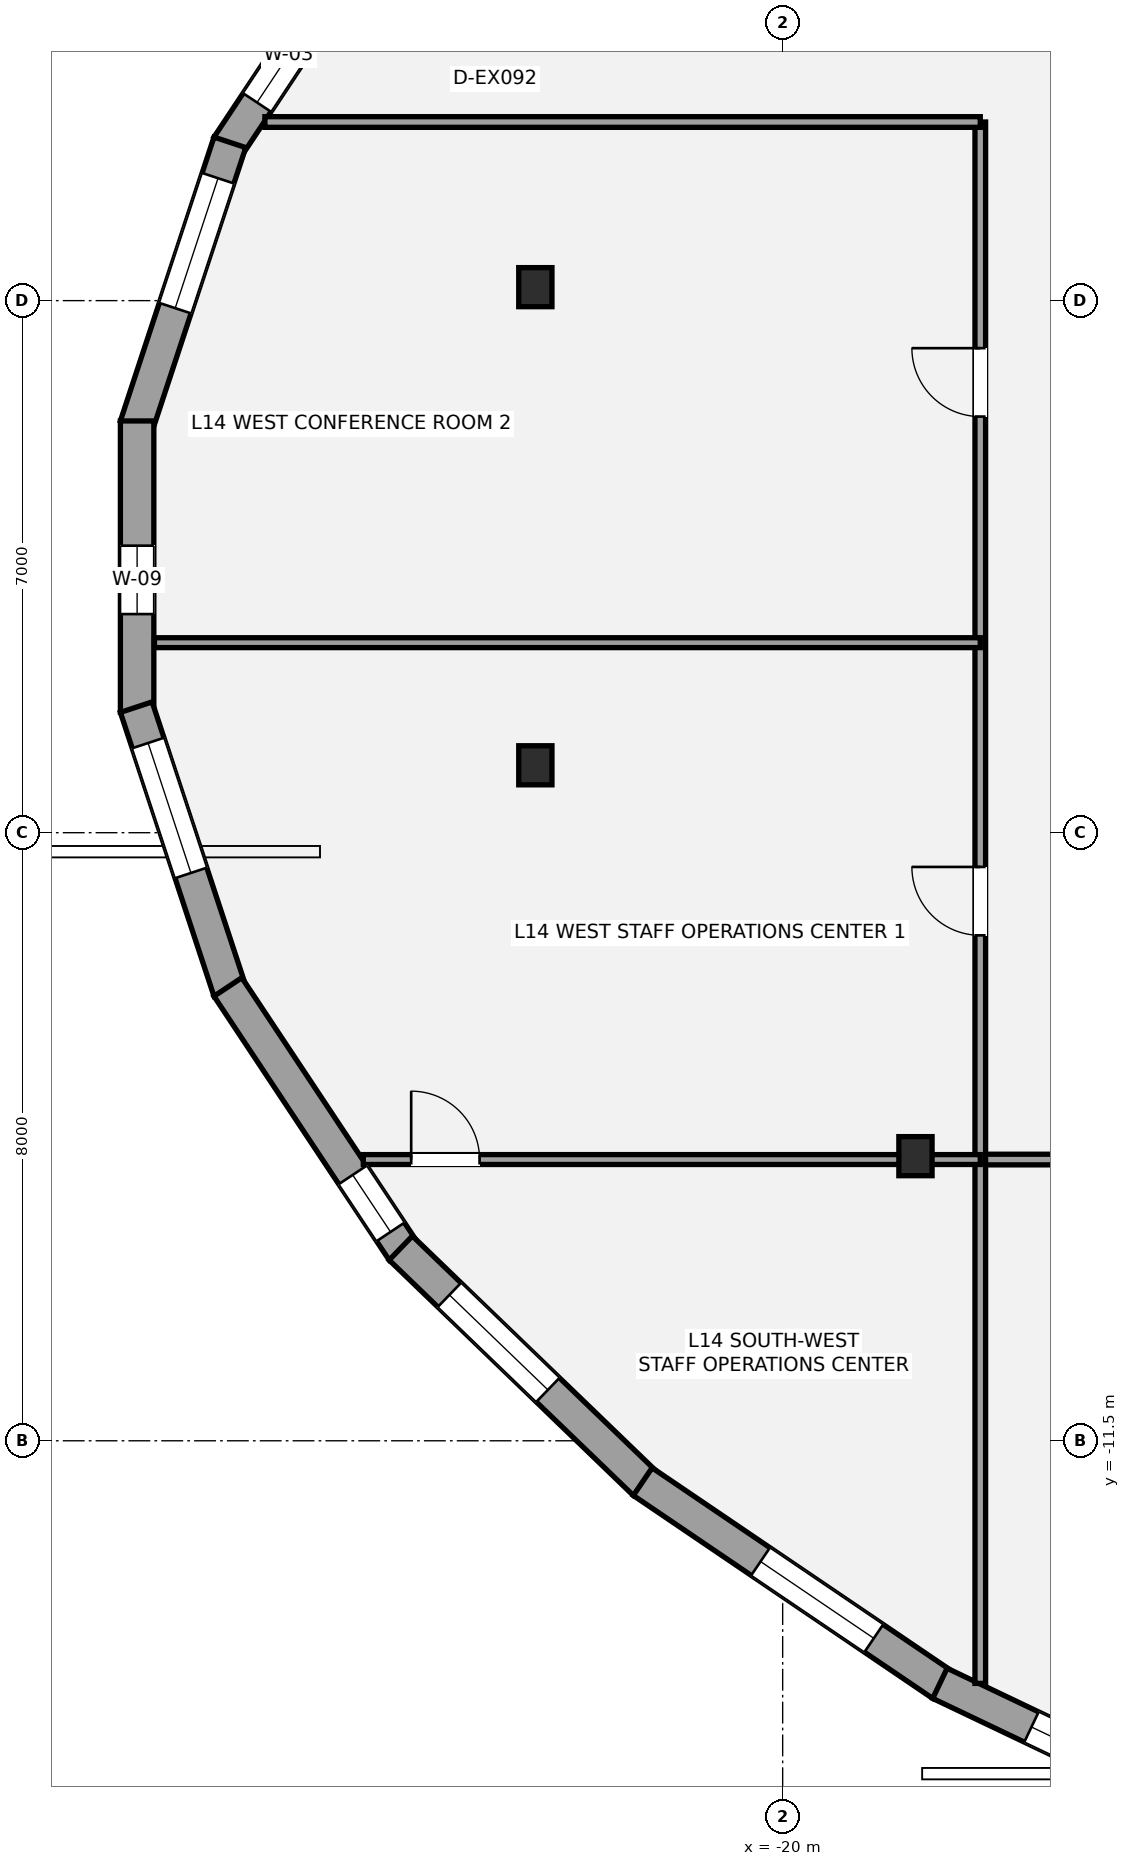
"""IFC4 building model, lengths in metres.
Left out: names, types, materials, properties, quantities, classifications, styles, units other than length and angle.
Written with IfcOpenShell. Run it as: python <this file> out.ifc"""

import sys

from ifc_helpers import new_model, si_unit, direction, frame, frame_2d, origin, origin_2d, place, context, subcontext, project, spatial, rectangle, i_section, extrude, element, fill, save


model = new_model("IFC4")
c1 = context("Model", 3, precision=1e-05, world=origin(), true_north=direction((0.0, 1.0)))
c2 = subcontext(c1, "Body", "Model", "MODEL_VIEW")
j1 = project(units=[si_unit("LENGTHUNIT", "METRE"), si_unit("PLANEANGLEUNIT", "RADIAN")], contexts=[c1])
p1 = place(None, origin())
s1 = spatial("IfcSite", under=j1, at=p1, CompositionType="ELEMENT")
p2 = place(p1, origin())
s2 = spatial("IfcBuilding", under=s1, at=p2, CompositionType="ELEMENT")
p3 = place(p2, frame((0.0, 0.0, 55.8)))
s3 = spatial("IfcBuildingStorey", under=s2, at=p3, CompositionType="ELEMENT", Elevation=55.8)
for number, where, z_axis, x_axis in (
    (1, (-23.254, 3.677, 0.0), (0.0, 0.0, 1.0), (1.0, 0.0, 0.0)),
    (2, (-23.254, -2.613, 0.0), (0.0, 0.0, 1.0), (1.0, 0.0, 0.0)),
    (3, (-18.253, -7.756, 0.0), (0.0, 0.0, 1.0), (1.0, 0.0, 0.0)),
):
    element("IfcColumn", number, at=place(p3, frame(where, z_axis=z_axis, x_axis=x_axis)), inside=s3, PredefinedType="COLUMN", context=c2, shape_type="SweptSolid", body=[
        extrude(i_section(OverallWidth=0.437, OverallDepth=0.514, WebThickness=0.061, FlangeThickness=0.097, at=origin_2d()), origin(), (0.0, 0.0, 1.0), 3.6),
    ])
p4 = place(p3, frame((-27.299, 5.53, 0.0), z_axis=(0.0, 0.0, 1.0), x_axis=(0.553144350008, 0.833085426625, 0.0)))
e4 = element("IfcWall", 4, at=p4, inside=s3, PredefinedType="STANDARD", context=c2, shape_type="SweptSolid", body=[
    extrude(rectangle(XDim=4.167, YDim=0.44, at=frame_2d((2.083, 0.0))), origin(), (0.0, 0.0, 1.0), 2.529),
])
p5 = place(p4, frame((0.693, 0.0, 0.65)))
e5 = element("IfcOpeningElement", 5, at=p5, cuts=e4, PredefinedType="OPENING", context=c2, shape_type="SweptSolid", body=[
    extrude(rectangle(XDim=1.5, YDim=1.7, at=frame_2d((0.75, 0.85))), frame((0.0, 0.23, 0.0), z_axis=(0.0, -1.0, 0.0), x_axis=(1.0, 0.0, 0.0)), (0.0, 0.0, 1.0), 0.46),
])
p6 = place(p3, frame((-28.505, 1.848, 0.0), z_axis=(0.0, 0.0, 1.0), x_axis=(0.31317140165, 0.949696621658, 0.0)))
e6 = element("IfcWall", 6, at=p6, inside=s3, PredefinedType="STANDARD", context=c2, shape_type="SweptSolid", body=[
    extrude(rectangle(XDim=3.932, YDim=0.44, at=frame_2d((1.966, 0.0))), origin(), (0.0, 0.0, 1.0), 2.533),
])
p7 = place(p6, frame((1.635, 0.0, 0.65)))
e7 = element("IfcOpeningElement", 7, at=p7, cuts=e6, PredefinedType="OPENING", context=c2, shape_type="SweptSolid", body=[
    extrude(rectangle(XDim=1.8, YDim=1.7, at=frame_2d((0.9, 0.85))), frame((0.0, 0.23, 0.0), z_axis=(0.0, -1.0, 0.0), x_axis=(1.0, 0.0, 0.0)), (0.0, 0.0, 1.0), 0.46),
])
p8 = place(p3, frame((-28.494, -1.917, 0.0), z_axis=(0.0, 0.0, 1.0), x_axis=(0.0, 1.0, 0.0)))
e8 = element("IfcWall", 8, at=p8, inside=s3, PredefinedType="STANDARD", context=c2, shape_type="SweptSolid", body=[
    extrude(rectangle(XDim=3.834, YDim=0.44, at=frame_2d((1.917, 0.0))), origin(), (0.0, 0.0, 1.0), 2.533),
])
p9 = place(p8, frame((1.293, 0.0, 0.58)))
e9 = element("IfcOpeningElement", 9, at=p9, cuts=e8, PredefinedType="OPENING", context=c2, shape_type="SweptSolid", body=[
    extrude(rectangle(XDim=0.9, YDim=1.35, at=frame_2d((0.45, 0.675))), frame((0.0, 0.23, 0.0), z_axis=(0.0, -1.0, 0.0), x_axis=(1.0, 0.0, 0.0)), (0.0, 0.0, 1.0), 0.46),
])
p10 = place(p3, frame((-27.273, -5.583, 0.0), z_axis=(0.0, 0.0, 1.0), x_axis=(-0.31317140165, 0.949696621658, 0.0)))
e10 = element("IfcWall", 10, at=p10, inside=s3, PredefinedType="STANDARD", context=c2, shape_type="SweptSolid", body=[
    extrude(rectangle(XDim=3.932, YDim=0.44, at=frame_2d((1.966, 0.0))), origin(), (0.0, 0.0, 1.0), 2.533),
])
p11 = place(p10, frame((1.635, 0.0, 0.65)))
e11 = element("IfcOpeningElement", 11, at=p11, cuts=e10, PredefinedType="OPENING", context=c2, shape_type="SweptSolid", body=[
    extrude(rectangle(XDim=1.8, YDim=1.7, at=frame_2d((0.9, 0.85))), frame((0.0, 0.23, 0.0), z_axis=(0.0, -1.0, 0.0), x_axis=(1.0, 0.0, 0.0)), (0.0, 0.0, 1.0), 0.46),
])
p12 = place(p3, frame((-24.994, -9.001, 0.0), z_axis=(0.0, 0.0, 1.0), x_axis=(-0.553144350008, 0.833085426625, 0.0)))
e12 = element("IfcWall", 12, at=p12, inside=s3, PredefinedType="STANDARD", context=c2, shape_type="SweptSolid", body=[
    extrude(rectangle(XDim=4.167, YDim=0.44, at=frame_2d((2.083, 0.0))), origin(), (0.0, 0.0, 1.0), 2.529),
])
p13 = place(p12, frame((0.299, 0.0, 0.58)))
e13 = element("IfcOpeningElement", 13, at=p13, cuts=e12, PredefinedType="OPENING", context=c2, shape_type="SweptSolid", body=[
    extrude(rectangle(XDim=0.9, YDim=1.35, at=frame_2d((0.45, 0.675))), frame((0.0, 0.23, 0.0), z_axis=(0.0, -1.0, 0.0), x_axis=(1.0, 0.0, 0.0)), (0.0, 0.0, 1.0), 0.46),
])
p14 = place(p3, frame((-21.812, -12.061, 0.0), z_axis=(0.0, 0.0, 1.0), x_axis=(-0.719928259859, 0.694048485811, 0.0)))
e14 = element("IfcWall", 14, at=p14, inside=s3, PredefinedType="STANDARD", context=c2, shape_type="SweptSolid", body=[
    extrude(rectangle(XDim=4.462, YDim=0.44, at=frame_2d((2.231, 0.0))), origin(), (0.0, 0.0, 1.0), 2.529),
])
p15 = place(p14, frame((1.774, 0.0, 0.65)))
e15 = element("IfcOpeningElement", 15, at=p15, cuts=e14, PredefinedType="OPENING", context=c2, shape_type="SweptSolid", body=[
    extrude(rectangle(XDim=1.8, YDim=1.7, at=frame_2d((0.9, 0.85))), frame((0.0, 0.23, 0.0), z_axis=(0.0, -1.0, 0.0), x_axis=(1.0, 0.0, 0.0)), (0.0, 0.0, 1.0), 0.46),
])
p16 = place(p3, frame((-17.903, -14.708, 0.0), z_axis=(0.0, 0.0, 1.0), x_axis=(-0.827723442454, 0.561136260468, 0.0)))
e16 = element("IfcWall", 16, at=p16, inside=s3, PredefinedType="STANDARD", context=c2, shape_type="SweptSolid", body=[
    extrude(rectangle(XDim=4.759, YDim=0.44, at=frame_2d((2.379, 0.0))), origin(), (0.0, 0.0, 1.0), 2.529),
])
p17 = place(p16, frame((1.086, 0.0, 0.65)))
e17 = element("IfcOpeningElement", 17, at=p17, cuts=e16, PredefinedType="OPENING", context=c2, shape_type="SweptSolid", body=[
    extrude(rectangle(XDim=1.8, YDim=1.7, at=frame_2d((0.9, 0.85))), frame((0.0, 0.23, 0.0), z_axis=(0.0, -1.0, 0.0), x_axis=(1.0, 0.0, 0.0)), (0.0, 0.0, 1.0), 0.46),
])
p18 = place(p3, frame((-13.363, -16.869, 0.0), z_axis=(0.0, 0.0, 1.0), x_axis=(-0.902682101727, 0.430308056189, 0.0)))
e18 = element("IfcWall", 18, at=p18, inside=s3, PredefinedType="STANDARD", context=c2, shape_type="SweptSolid", body=[
    extrude(rectangle(XDim=5.061, YDim=0.44, at=frame_2d((2.53, 0.0))), origin(), (0.0, 0.0, 1.0), 2.529),
])
p19 = place(p18, frame((1.927, 0.0, 0.65)))
e19 = element("IfcOpeningElement", 19, at=p19, cuts=e18, PredefinedType="OPENING", context=c2, shape_type="SweptSolid", body=[
    extrude(rectangle(XDim=1.8, YDim=1.7, at=frame_2d((0.9, 0.85))), frame((0.0, 0.23, 0.0), z_axis=(0.0, -1.0, 0.0), x_axis=(1.0, 0.0, 0.0)), (0.0, 0.0, 1.0), 0.46),
])
p20 = place(p3, frame((-17.4, -7.8, 0.0), z_axis=(0.0, 0.0, 1.0), x_axis=(1.0, 0.0, 0.0)))
e20 = element("IfcWall", 20, at=p20, inside=s3, PredefinedType="PARTITIONING", context=c2, shape_type="SweptSolid", body=[
    extrude(rectangle(XDim=34.8, YDim=0.14, at=frame_2d((17.4, 0.0))), origin(), (0.0, 0.0, 1.0), 2.779),
])
p21 = place(p20, frame((3.5, 0.0, 0.0)))
e21 = element("IfcOpeningElement", 21, at=p21, cuts=e20, PredefinedType="OPENING", context=c2, shape_type="SweptSolid", body=[
    extrude(rectangle(XDim=0.9, YDim=2.1, at=frame_2d((0.45, 1.05))), frame((0.0, 0.08, 0.0), z_axis=(0.0, -1.0, 0.0), x_axis=(1.0, 0.0, 0.0)), (0.0, 0.0, 1.0), 0.16),
])
p22 = place(p20, frame((10.95, 0.0, 0.0)))
e22 = element("IfcOpeningElement", 22, at=p22, cuts=e20, PredefinedType="OPENING", context=c2, shape_type="SweptSolid", body=[
    extrude(rectangle(XDim=0.9, YDim=2.1, at=frame_2d((0.45, 1.05))), frame((0.0, 0.08, 0.0), z_axis=(0.0, -1.0, 0.0), x_axis=(1.0, 0.0, 0.0)), (0.0, 0.0, 1.0), 0.16),
])
p23 = place(p20, frame((17.95, 0.0, 0.0)))
e23 = element("IfcOpeningElement", 23, at=p23, cuts=e20, PredefinedType="OPENING", context=c2, shape_type="SweptSolid", body=[
    extrude(rectangle(XDim=0.9, YDim=2.1, at=frame_2d((0.45, 1.05))), frame((0.0, 0.08, 0.0), z_axis=(0.0, -1.0, 0.0), x_axis=(1.0, 0.0, 0.0)), (0.0, 0.0, 1.0), 0.16),
])
p24 = place(p20, frame((24.45, 0.0, 0.0)))
e24 = element("IfcOpeningElement", 24, at=p24, cuts=e20, PredefinedType="OPENING", context=c2, shape_type="SweptSolid", body=[
    extrude(rectangle(XDim=0.9, YDim=2.1, at=frame_2d((0.45, 1.05))), frame((0.0, 0.08, 0.0), z_axis=(0.0, -1.0, 0.0), x_axis=(1.0, 0.0, 0.0)), (0.0, 0.0, 1.0), 0.16),
])
p25 = place(p20, frame((30.9, 0.0, 0.0)))
e25 = element("IfcOpeningElement", 25, at=p25, cuts=e20, PredefinedType="OPENING", context=c2, shape_type="SweptSolid", body=[
    extrude(rectangle(XDim=0.9, YDim=2.1, at=frame_2d((0.45, 1.05))), frame((0.0, 0.08, 0.0), z_axis=(0.0, -1.0, 0.0), x_axis=(1.0, 0.0, 0.0)), (0.0, 0.0, 1.0), 0.16),
])
p26 = place(p3, frame((-17.4, -14.692, 0.0), z_axis=(0.0, 0.0, 1.0), x_axis=(0.0, 1.0, 0.0)))
e26 = element("IfcWall", 26, at=p26, inside=s3, PredefinedType="PARTITIONING", context=c2, shape_type="SweptSolid", body=[
    extrude(rectangle(XDim=20.542, YDim=0.14, at=frame_2d((10.271, 0.0))), origin(), (0.0, 0.0, 1.0), 2.841),
])
p27 = place(p26, frame((9.841, 0.0, 0.0)))
e27 = element("IfcOpeningElement", 27, at=p27, cuts=e26, PredefinedType="OPENING", context=c2, shape_type="SweptSolid", body=[
    extrude(rectangle(XDim=0.9, YDim=2.1, at=frame_2d((0.45, 1.05))), frame((0.0, 0.08, 0.0), z_axis=(0.0, -1.0, 0.0), x_axis=(1.0, 0.0, 0.0)), (0.0, 0.0, 1.0), 0.16),
])
p28 = place(p26, frame((16.667, 0.0, 0.0)))
e28 = element("IfcOpeningElement", 28, at=p28, cuts=e26, PredefinedType="OPENING", context=c2, shape_type="SweptSolid", body=[
    extrude(rectangle(XDim=0.9, YDim=2.1, at=frame_2d((0.45, 1.05))), frame((0.0, 0.08, 0.0), z_axis=(0.0, -1.0, 0.0), x_axis=(1.0, 0.0, 0.0)), (0.0, 0.0, 1.0), 0.16),
])
p29 = place(p3, frame((-26.812, 5.85, 0.0), z_axis=(0.0, 0.0, 1.0), x_axis=(1.0, 0.0, 0.0)))
e29 = element("IfcWall", 29, at=p29, inside=s3, PredefinedType="PARTITIONING", context=c2, shape_type="SweptSolid", body=[
    extrude(rectangle(XDim=9.413, YDim=0.14, at=frame_2d((4.706, 0.0))), origin(), (0.0, 0.0, 1.0), 2.853),
])
p30 = place(p3, frame((-25.518, -7.8, 0.0), z_axis=(0.0, 0.0, 1.0), x_axis=(1.0, 0.0, 0.0)))
e30 = element("IfcWall", 30, at=p30, inside=s3, PredefinedType="PARTITIONING", context=c2, shape_type="SweptSolid", body=[
    extrude(rectangle(XDim=8.118, YDim=0.13, at=frame_2d((4.059, 0.0))), origin(), (0.0, 0.0, 1.0), 2.779),
])
p31 = place(p30, frame((0.63, 0.0, 0.0)))
e31 = element("IfcOpeningElement", 31, at=p31, cuts=e30, PredefinedType="OPENING", context=c2, shape_type="SweptSolid", body=[
    extrude(rectangle(XDim=0.9, YDim=2.1, at=frame_2d((0.45, 1.05))), frame((0.0, 0.075, 0.0), z_axis=(0.0, -1.0, 0.0), x_axis=(1.0, 0.0, 0.0)), (0.0, 0.0, 1.0), 0.15),
])
p32 = place(p3, frame((-28.266, -1.0, 0.0), z_axis=(0.0, 0.0, 1.0), x_axis=(1.0, 0.0, 0.0)))
e32 = element("IfcWall", 32, at=p32, inside=s3, PredefinedType="PARTITIONING", context=c2, shape_type="SweptSolid", body=[
    extrude(rectangle(XDim=10.866, YDim=0.13, at=frame_2d((5.433, 0.0))), origin(), (0.0, 0.0, 1.0), 2.841),
])
p33 = place(p5, origin())
e33 = element("IfcWindow", 33, at=p33, inside=s3, PartitioningType="SINGLE_PANEL", PredefinedType="WINDOW", context=c2, shape_type="SweptSolid", body=[
    extrude(rectangle(XDim=1.5, YDim=1.7, at=frame_2d((0.75, 0.85))), frame((0.0, -0.01, 0.0), z_axis=(0.0, -1.0, 0.0), x_axis=(1.0, 0.0, 0.0)), (0.0, 0.0, 1.0), 0.06),
])
fill(e5, e33)
p34 = place(p7, origin())
e34 = element("IfcWindow", 34, at=p34, inside=s3, PartitioningType="SINGLE_PANEL", PredefinedType="WINDOW", context=c2, shape_type="SweptSolid", body=[
    extrude(rectangle(XDim=1.8, YDim=1.7, at=frame_2d((0.9, 0.85))), frame((0.0, -0.01, 0.0), z_axis=(0.0, -1.0, 0.0), x_axis=(1.0, 0.0, 0.0)), (0.0, 0.0, 1.0), 0.06),
])
fill(e7, e34)
p35 = place(p9, origin())
e35 = element("IfcWindow", 35, at=p35, inside=s3, PartitioningType="SINGLE_PANEL", PredefinedType="WINDOW", context=c2, shape_type="SweptSolid", body=[
    extrude(rectangle(XDim=0.9, YDim=1.35, at=frame_2d((0.45, 0.675))), frame((0.0, -0.01, 0.0), z_axis=(0.0, -1.0, 0.0), x_axis=(1.0, 0.0, 0.0)), (0.0, 0.0, 1.0), 0.06),
])
fill(e9, e35)
p36 = place(p11, origin())
e36 = element("IfcWindow", 36, at=p36, inside=s3, PartitioningType="SINGLE_PANEL", PredefinedType="WINDOW", context=c2, shape_type="SweptSolid", body=[
    extrude(rectangle(XDim=1.8, YDim=1.7, at=frame_2d((0.9, 0.85))), frame((0.0, -0.01, 0.0), z_axis=(0.0, -1.0, 0.0), x_axis=(1.0, 0.0, 0.0)), (0.0, 0.0, 1.0), 0.06),
])
fill(e11, e36)
p37 = place(p13, origin())
e37 = element("IfcWindow", 37, at=p37, inside=s3, PartitioningType="SINGLE_PANEL", PredefinedType="WINDOW", context=c2, shape_type="SweptSolid", body=[
    extrude(rectangle(XDim=0.9, YDim=1.35, at=frame_2d((0.45, 0.675))), frame((0.0, -0.01, 0.0), z_axis=(0.0, -1.0, 0.0), x_axis=(1.0, 0.0, 0.0)), (0.0, 0.0, 1.0), 0.06),
])
fill(e13, e37)
p38 = place(p15, origin())
e38 = element("IfcWindow", 38, at=p38, inside=s3, PartitioningType="SINGLE_PANEL", PredefinedType="WINDOW", context=c2, shape_type="SweptSolid", body=[
    extrude(rectangle(XDim=1.8, YDim=1.7, at=frame_2d((0.9, 0.85))), frame((0.0, -0.01, 0.0), z_axis=(0.0, -1.0, 0.0), x_axis=(1.0, 0.0, 0.0)), (0.0, 0.0, 1.0), 0.06),
])
fill(e15, e38)
p39 = place(p17, origin())
e39 = element("IfcWindow", 39, at=p39, inside=s3, PartitioningType="SINGLE_PANEL", PredefinedType="WINDOW", context=c2, shape_type="SweptSolid", body=[
    extrude(rectangle(XDim=1.8, YDim=1.7, at=frame_2d((0.9, 0.85))), frame((0.0, -0.01, 0.0), z_axis=(0.0, -1.0, 0.0), x_axis=(1.0, 0.0, 0.0)), (0.0, 0.0, 1.0), 0.06),
])
fill(e17, e39)
p40 = place(p19, origin())
e40 = element("IfcWindow", 40, at=p40, inside=s3, PartitioningType="SINGLE_PANEL", PredefinedType="WINDOW", context=c2, shape_type="SweptSolid", body=[
    extrude(rectangle(XDim=1.8, YDim=1.7, at=frame_2d((0.9, 0.85))), frame((0.0, -0.01, 0.0), z_axis=(0.0, -1.0, 0.0), x_axis=(1.0, 0.0, 0.0)), (0.0, 0.0, 1.0), 0.06),
])
fill(e19, e40)
p41 = place(p31, origin())
e41 = element("IfcDoor", 41, at=p41, inside=s3, OperationType="SINGLE_SWING_LEFT", PredefinedType="DOOR", context=c2, shape_type="SweptSolid", body=[
    extrude(rectangle(XDim=0.9, YDim=2.1, at=frame_2d((0.45, 1.05))), frame((0.0, 0.025, 0.0), z_axis=(0.0, -1.0, 0.0), x_axis=(1.0, 0.0, 0.0)), (0.0, 0.0, 1.0), 0.05),
])
fill(e31, e41)
p42 = place(p27, origin())
e42 = element("IfcDoor", 42, at=p42, inside=s3, OperationType="SINGLE_SWING_RIGHT", PredefinedType="DOOR", context=c2, shape_type="SweptSolid", body=[
    extrude(rectangle(XDim=0.9, YDim=2.1, at=frame_2d((0.45, 1.05))), frame((0.0, 0.025, 0.0), z_axis=(0.0, -1.0, 0.0), x_axis=(1.0, 0.0, 0.0)), (0.0, 0.0, 1.0), 0.05),
])
fill(e27, e42)
p43 = place(p28, origin())
e43 = element("IfcDoor", 43, at=p43, inside=s3, OperationType="SINGLE_SWING_RIGHT", PredefinedType="DOOR", context=c2, shape_type="SweptSolid", body=[
    extrude(rectangle(XDim=0.9, YDim=2.1, at=frame_2d((0.45, 1.05))), frame((0.0, 0.025, 0.0), z_axis=(0.0, -1.0, 0.0), x_axis=(1.0, 0.0, 0.0)), (0.0, 0.0, 1.0), 0.05),
])
fill(e28, e43)
save(model, sys.argv[1])
